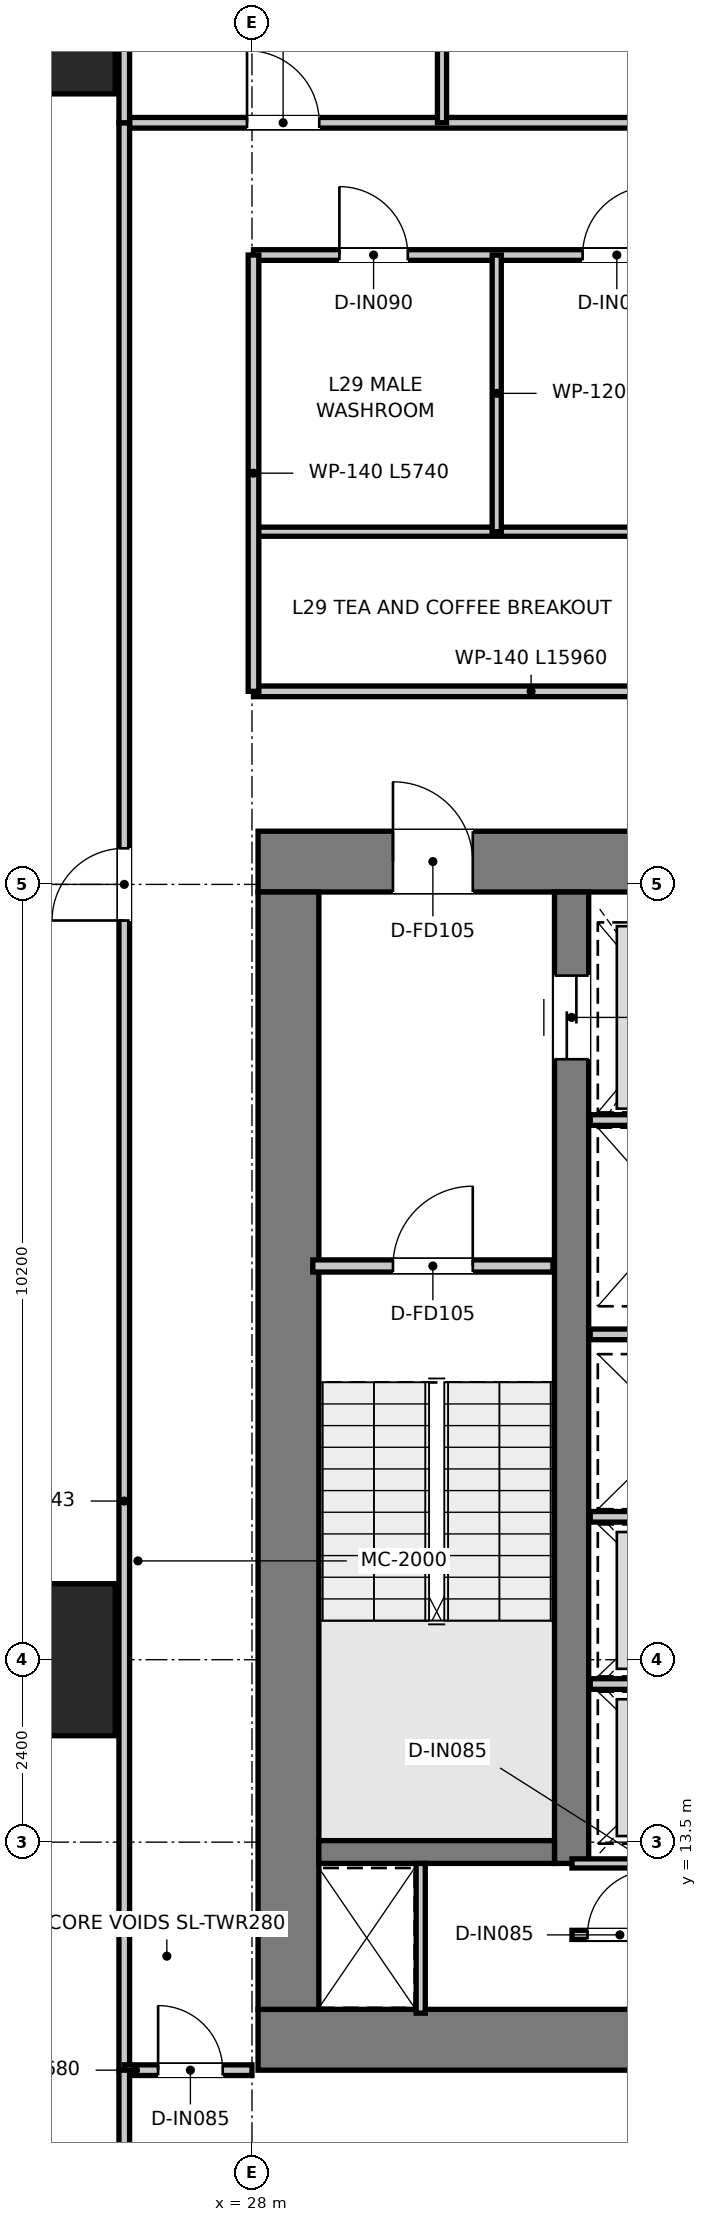
"""IFC4 building model, lengths in metres.
Left out: names, types, materials, properties, quantities, classifications, styles, units other than length and angle.
Written with IfcOpenShell. Run it as: python <this file> out.ifc"""

import sys

from ifc_helpers import new_model, si_unit, direction, frame, frame_2d, origin, origin_2d, place, context, subcontext, project, spatial, rectangle, extrude, source, transform, mapped, element, fill, save


model = new_model("IFC4")
c1 = context("Model", 3, precision=1e-05, world=origin(), true_north=direction((0.0, 1.0)))
c2 = subcontext(c1, "Body", "Model", "MODEL_VIEW")
j1 = project(units=[si_unit("LENGTHUNIT", "METRE"), si_unit("PLANEANGLEUNIT", "RADIAN")], contexts=[c1])
p1 = place(None, origin())
s1 = spatial("IfcSite", under=j1, at=p1, CompositionType="ELEMENT")
p2 = place(p1, origin())
s2 = spatial("IfcBuilding", under=s1, at=p2, CompositionType="ELEMENT")
p3 = place(p2, frame((0.0, 0.0, 121.65)))
s3 = spatial("IfcBuildingStorey", under=s2, at=p3, CompositionType="ELEMENT", Elevation=121.65)
p4 = place(p3, frame((28.08, 10.9, 0.0), z_axis=(0.0, 0.0, 1.0), x_axis=(1.0, 0.0, 0.0)))
e1 = element("IfcWall", 1, at=p4, inside=s3, PredefinedType="SHEAR", context=c2, shape_type="SweptSolid", body=[
    extrude(rectangle(XDim=15.84, YDim=0.8, at=frame_2d((7.92, 0.0))), origin(), (0.0, 0.0, 1.0), 3.95),
])
p5 = place(p3, frame((28.08, 26.4, 0.0), z_axis=(0.0, 0.0, 1.0), x_axis=(1.0, 0.0, 0.0)))
e2 = element("IfcWall", 2, at=p5, inside=s3, PredefinedType="SHEAR", context=c2, shape_type="SweptSolid", body=[
    extrude(rectangle(XDim=15.84, YDim=0.8, at=frame_2d((7.92, 0.0))), origin(), (0.0, 0.0, 1.0), 3.95),
])
p6 = place(p5, frame((7.22, 0.0, 0.0)))
e3 = element("IfcOpeningElement", 3, at=p6, cuts=e2, PredefinedType="OPENING", context=c2, shape_type="SweptSolid", body=[
    extrude(rectangle(XDim=1.4, YDim=2.2, at=frame_2d((0.7, 1.1))), frame((0.0, 0.41, 0.0), z_axis=(0.0, -1.0, 0.0), x_axis=(1.0, 0.0, 0.0)), (0.0, 0.0, 1.0), 0.82),
])
p7 = place(p5, frame((1.775, 0.0, 0.0)))
e4 = element("IfcOpeningElement", 4, at=p7, cuts=e2, PredefinedType="OPENING", context=c2, shape_type="SweptSolid", body=[
    extrude(rectangle(XDim=1.05, YDim=2.1, at=frame_2d((0.525, 1.05))), frame((0.0, 0.41, 0.0), z_axis=(0.0, -1.0, 0.0), x_axis=(1.0, 0.0, 0.0)), (0.0, 0.0, 1.0), 0.82),
])
p8 = place(p5, frame((13.015, 0.0, 0.0)))
e5 = element("IfcOpeningElement", 5, at=p8, cuts=e2, PredefinedType="OPENING", context=c2, shape_type="SweptSolid", body=[
    extrude(rectangle(XDim=1.05, YDim=2.1, at=frame_2d((0.525, 1.05))), frame((0.0, 0.41, 0.0), z_axis=(0.0, -1.0, 0.0), x_axis=(1.0, 0.0, 0.0)), (0.0, 0.0, 1.0), 0.82),
])
p9 = place(p3, frame((28.48, 11.3, 0.0), z_axis=(0.0, 0.0, 1.0), x_axis=(0.0, 1.0, 0.0)))
e6 = element("IfcWall", 6, at=p9, inside=s3, PredefinedType="SHEAR", context=c2, shape_type="SweptSolid", body=[
    extrude(rectangle(XDim=14.7, YDim=0.8, at=frame_2d((7.35, 0.0))), origin(), (0.0, 0.0, 1.0), 3.95),
])
p10 = place(p3, frame((32.205, 13.22, 0.0), z_axis=(0.0, 0.0, 1.0), x_axis=(0.0, 1.0, 0.0)))
e7 = element("IfcWall", 7, at=p10, inside=s3, PredefinedType="SHEAR", context=c2, shape_type="SweptSolid", body=[
    extrude(rectangle(XDim=12.78, YDim=0.45, at=frame_2d((6.39, 0.0))), origin(), (0.0, 0.0, 1.0), 3.95),
])
p11 = place(p10, frame((10.58, 0.0, 0.0)))
e8 = element("IfcOpeningElement", 8, at=p11, cuts=e7, PredefinedType="OPENING", context=c2, shape_type="SweptSolid", body=[
    extrude(rectangle(XDim=1.1, YDim=2.15, at=frame_2d((0.55, 1.075))), frame((0.0, 0.235, 0.0), z_axis=(0.0, -1.0, 0.0), x_axis=(1.0, 0.0, 0.0)), (0.0, 0.0, 1.0), 0.47),
])
p12 = place(p3, frame((28.88, 13.37, 0.0), z_axis=(0.0, 0.0, 1.0), x_axis=(1.0, 0.0, 0.0)))
e9 = element("IfcWall", 9, at=p12, inside=s3, PredefinedType="SHEAR", context=c2, shape_type="SweptSolid", body=[
    extrude(rectangle(XDim=3.1, YDim=0.3, at=frame_2d((1.55, 0.0))), origin(), (0.0, 0.0, 1.0), 3.95),
])
m1 = source(origin(), c2, "Body", "SweptSolid", [
    extrude(rectangle(XDim=2.0, YDim=2.0, at=origin_2d()), origin(), (0.0, 0.0, 1.0), 3.95),
])
for number, where, z_axis, x_axis in (
    (10, (25.2, 15.9, 0.0), (0.0, 0.0, 1.0), (1.0, 0.0, 0.0)),
    (11, (25.2, 37.5, 0.0), (0.0, 0.0, 1.0), (1.0, 0.0, 0.0)),
):
    element("IfcColumn", number, at=place(p3, frame(where, z_axis=z_axis, x_axis=x_axis)), inside=s3, PredefinedType="USERDEFINED", context=c2, shape_type="MappedRepresentation", body=[
        mapped(m1, transform((0.0, 0.0, 0.0), x_axis=(1.0, 0.0, 0.0), y_axis=(0.0, 1.0, 0.0), z_axis=(0.0, 0.0, 1.0), scale=1.0)),
    ])
p13 = place(p3, frame((28.8, 21.08, 0.0), z_axis=(0.0, 0.0, 1.0), x_axis=(1.0, 0.0, 0.0)))
e12 = element("IfcWall", 12, at=p13, inside=s3, PredefinedType="PARTITIONING", context=c2, shape_type="SweptSolid", body=[
    extrude(rectangle(XDim=3.16, YDim=0.16, at=frame_2d((1.58, 0.0))), origin(), (0.0, 0.0, 1.0), 3.67),
])
p14 = place(p13, frame((1.055, 0.0, 0.0)))
e13 = element("IfcOpeningElement", 13, at=p14, cuts=e12, PredefinedType="OPENING", context=c2, shape_type="SweptSolid", body=[
    extrude(rectangle(XDim=1.05, YDim=2.1, at=frame_2d((0.525, 1.05))), frame((0.0, 0.09, 0.0), z_axis=(0.0, -1.0, 0.0), x_axis=(1.0, 0.0, 0.0)), (0.0, 0.0, 1.0), 0.18),
])
p15 = place(p3, frame((32.45, 23.0, 0.0), z_axis=(0.0, 0.0, 1.0), x_axis=(1.0, 0.0, 0.0)))
e14 = element("IfcWall", 14, at=p15, inside=s3, PredefinedType="PARTITIONING", context=c2, shape_type="SweptSolid", body=[
    extrude(rectangle(XDim=2.27, YDim=0.14, at=frame_2d((1.135, 0.0))), origin(), (0.0, 0.0, 1.0), 2.67),
])
for number, where, z_axis, x_axis in (
    (15, (32.45, 17.78, 0.0), (0.0, 0.0, 1.0), (1.0, 0.0, 0.0)),
    (16, (32.45, 20.18, 0.0), (0.0, 0.0, 1.0), (1.0, 0.0, 0.0)),
    (17, (32.45, 15.58, 0.0), (0.0, 0.0, 1.0), (1.0, 0.0, 0.0)),
):
    element("IfcWall", number, at=place(p3, frame(where, z_axis=z_axis, x_axis=x_axis)), inside=s3, PredefinedType="PARTITIONING", context=c2, shape_type="SweptSolid", body=[
        extrude(rectangle(XDim=2.27, YDim=0.14, at=frame_2d((1.135, 0.0))), origin(), (0.0, 0.0, 1.0), 3.67),
    ])
p16 = place(p3, frame((30.22, 11.25, 0.0), z_axis=(0.0, 0.0, 1.0), x_axis=(0.0, 1.0, 0.0)))
e18 = element("IfcWall", 18, at=p16, inside=s3, PredefinedType="PARTITIONING", context=c2, shape_type="SweptSolid", body=[
    extrude(rectangle(XDim=1.97, YDim=0.12, at=frame_2d((0.985, 0.0))), origin(), (0.0, 0.0, 1.0), 3.67),
])
p17 = place(p3, frame((32.21, 13.22, 0.0), z_axis=(0.0, 0.0, 1.0), x_axis=(1.0, 0.0, 0.0)))
e19 = element("IfcWall", 19, at=p17, inside=s3, PredefinedType="PARTITIONING", context=c2, shape_type="SweptSolid", body=[
    extrude(rectangle(XDim=7.58, YDim=0.12, at=frame_2d((3.79, 0.0))), origin(), (0.0, 0.0, 1.0), 3.67),
])
p18 = place(p17, frame((3.365, 0.0, 0.0)))
e20 = element("IfcOpeningElement", 20, at=p18, cuts=e19, PredefinedType="OPENING", context=c2, shape_type="SweptSolid", body=[
    extrude(rectangle(XDim=0.85, YDim=2.1, at=frame_2d((0.425, 1.05))), frame((0.0, 0.07, 0.0), z_axis=(0.0, -1.0, 0.0), x_axis=(1.0, 0.0, 0.0)), (0.0, 0.0, 1.0), 0.14),
])
p19 = place(p3, frame((32.21, 12.28, 0.0), z_axis=(0.0, 0.0, 1.0), x_axis=(1.0, 0.0, 0.0)))
e21 = element("IfcWall", 21, at=p19, inside=s3, PredefinedType="PARTITIONING", context=c2, shape_type="SweptSolid", body=[
    extrude(rectangle(XDim=7.58, YDim=0.12, at=frame_2d((3.79, 0.0))), origin(), (0.0, 0.0, 1.0), 3.67),
])
p20 = place(p19, frame((0.205, 0.0, 0.0)))
e22 = element("IfcOpeningElement", 22, at=p20, cuts=e21, PredefinedType="OPENING", context=c2, shape_type="SweptSolid", body=[
    extrude(rectangle(XDim=0.85, YDim=2.1, at=frame_2d((0.425, 1.05))), frame((0.0, 0.07, 0.0), z_axis=(0.0, -1.0, 0.0), x_axis=(1.0, 0.0, 0.0)), (0.0, 0.0, 1.0), 0.14),
])
p21 = place(p19, frame((2.095, 0.0, 0.0)))
e23 = element("IfcOpeningElement", 23, at=p21, cuts=e21, PredefinedType="OPENING", context=c2, shape_type="SweptSolid", body=[
    extrude(rectangle(XDim=0.85, YDim=2.1, at=frame_2d((0.425, 1.05))), frame((0.0, 0.07, 0.0), z_axis=(0.0, -1.0, 0.0), x_axis=(1.0, 0.0, 0.0)), (0.0, 0.0, 1.0), 0.14),
])
p22 = place(p19, frame((4.635, 0.0, 0.0)))
e24 = element("IfcOpeningElement", 24, at=p22, cuts=e21, PredefinedType="OPENING", context=c2, shape_type="SweptSolid", body=[
    extrude(rectangle(XDim=0.85, YDim=2.1, at=frame_2d((0.425, 1.05))), frame((0.0, 0.07, 0.0), z_axis=(0.0, -1.0, 0.0), x_axis=(1.0, 0.0, 0.0)), (0.0, 0.0, 1.0), 0.14),
])
p23 = place(p19, frame((6.525, 0.0, 0.0)))
e25 = element("IfcOpeningElement", 25, at=p23, cuts=e21, PredefinedType="OPENING", context=c2, shape_type="SweptSolid", body=[
    extrude(rectangle(XDim=0.85, YDim=2.1, at=frame_2d((0.425, 1.05))), frame((0.0, 0.07, 0.0), z_axis=(0.0, -1.0, 0.0), x_axis=(1.0, 0.0, 0.0)), (0.0, 0.0, 1.0), 0.14),
])
p24 = place(p3, frame((28.02, 28.64, 0.0), z_axis=(0.0, 0.0, 1.0), x_axis=(1.0, 0.0, 0.0)))
e26 = element("IfcWall", 26, at=p24, inside=s3, PredefinedType="PARTITIONING", context=c2, shape_type="SweptSolid", body=[
    extrude(rectangle(XDim=15.96, YDim=0.14, at=frame_2d((7.98, 0.0))), origin(), (0.0, 0.0, 1.0), 3.08),
])
p25 = place(p24, frame((7.455, 0.0, 0.0)))
e27 = element("IfcOpeningElement", 27, at=p25, cuts=e26, PredefinedType="OPENING", context=c2, shape_type="SweptSolid", body=[
    extrude(rectangle(XDim=1.05, YDim=2.15, at=frame_2d((0.525, 1.075))), frame((0.0, 0.08, 0.0), z_axis=(0.0, -1.0, 0.0), x_axis=(1.0, 0.0, 0.0)), (0.0, 0.0, 1.0), 0.16),
])
p26 = place(p3, frame((28.02, 30.74, 0.0), z_axis=(0.0, 0.0, 1.0), x_axis=(1.0, 0.0, 0.0)))
e28 = element("IfcWall", 28, at=p26, inside=s3, PredefinedType="PARTITIONING", context=c2, shape_type="SweptSolid", body=[
    extrude(rectangle(XDim=15.96, YDim=0.12, at=frame_2d((7.98, 0.0))), origin(), (0.0, 0.0, 1.0), 3.08),
])
p27 = place(p3, frame((28.02, 34.38, 0.0), z_axis=(0.0, 0.0, 1.0), x_axis=(1.0, 0.0, 0.0)))
e29 = element("IfcWall", 29, at=p27, inside=s3, PredefinedType="PARTITIONING", context=c2, shape_type="SweptSolid", body=[
    extrude(rectangle(XDim=15.96, YDim=0.14, at=frame_2d((7.98, 0.0))), origin(), (0.0, 0.0, 1.0), 3.08),
])
p28 = place(p27, frame((1.13, 0.0, 0.0)))
e30 = element("IfcOpeningElement", 30, at=p28, cuts=e29, PredefinedType="OPENING", context=c2, shape_type="SweptSolid", body=[
    extrude(rectangle(XDim=0.9, YDim=2.1, at=frame_2d((0.45, 1.05))), frame((0.0, 0.08, 0.0), z_axis=(0.0, -1.0, 0.0), x_axis=(1.0, 0.0, 0.0)), (0.0, 0.0, 1.0), 0.16),
])
p29 = place(p27, frame((4.33, 0.0, 0.0)))
e31 = element("IfcOpeningElement", 31, at=p29, cuts=e29, PredefinedType="OPENING", context=c2, shape_type="SweptSolid", body=[
    extrude(rectangle(XDim=0.9, YDim=2.1, at=frame_2d((0.45, 1.05))), frame((0.0, 0.08, 0.0), z_axis=(0.0, -1.0, 0.0), x_axis=(1.0, 0.0, 0.0)), (0.0, 0.0, 1.0), 0.16),
])
p30 = place(p27, frame((7.355, 0.0, 0.0)))
e32 = element("IfcOpeningElement", 32, at=p30, cuts=e29, PredefinedType="OPENING", context=c2, shape_type="SweptSolid", body=[
    extrude(rectangle(XDim=0.95, YDim=2.1, at=frame_2d((0.475, 1.05))), frame((0.0, 0.08, 0.0), z_axis=(0.0, -1.0, 0.0), x_axis=(1.0, 0.0, 0.0)), (0.0, 0.0, 1.0), 0.16),
])
p31 = place(p27, frame((12.23, 0.0, 0.0)))
e33 = element("IfcOpeningElement", 33, at=p31, cuts=e29, PredefinedType="OPENING", context=c2, shape_type="SweptSolid", body=[
    extrude(rectangle(XDim=0.95, YDim=2.1, at=frame_2d((0.475, 1.05))), frame((0.0, 0.08, 0.0), z_axis=(0.0, -1.0, 0.0), x_axis=(1.0, 0.0, 0.0)), (0.0, 0.0, 1.0), 0.16),
])
p32 = place(p3, frame((28.02, 28.64, 0.0), z_axis=(0.0, 0.0, 1.0), x_axis=(0.0, 1.0, 0.0)))
e34 = element("IfcWall", 34, at=p32, inside=s3, PredefinedType="PARTITIONING", context=c2, shape_type="SweptSolid", body=[
    extrude(rectangle(XDim=5.74, YDim=0.14, at=frame_2d((2.87, 0.0))), origin(), (0.0, 0.0, 1.0), 3.27),
])
p33 = place(p3, frame((31.22, 30.74, 0.0), z_axis=(0.0, 0.0, 1.0), x_axis=(0.0, 1.0, 0.0)))
e35 = element("IfcWall", 35, at=p33, inside=s3, PredefinedType="PARTITIONING", context=c2, shape_type="SweptSolid", body=[
    extrude(rectangle(XDim=3.64, YDim=0.12, at=frame_2d((1.82, 0.0))), origin(), (0.0, 0.0, 1.0), 3.17),
])
p34 = place(p3, frame((26.32, 36.12, 0.0), z_axis=(0.0, 0.0, 1.0), x_axis=(1.0, 0.0, 0.0)))
e36 = element("IfcWall", 36, at=p34, inside=s3, PredefinedType="PARTITIONING", context=c2, shape_type="SweptSolid", body=[
    extrude(rectangle(XDim=19.36, YDim=0.14, at=frame_2d((9.68, 0.0))), origin(), (0.0, 0.0, 1.0), 3.08),
])
p35 = place(p34, frame((1.615, 0.0, 0.0)))
e37 = element("IfcOpeningElement", 37, at=p35, cuts=e36, PredefinedType="OPENING", context=c2, shape_type="SweptSolid", body=[
    extrude(rectangle(XDim=0.95, YDim=2.1, at=frame_2d((0.475, 1.05))), frame((0.0, 0.08, 0.0), z_axis=(0.0, -1.0, 0.0), x_axis=(1.0, 0.0, 0.0)), (0.0, 0.0, 1.0), 0.16),
])
p36 = place(p34, frame((6.705, 0.0, 0.0)))
e38 = element("IfcOpeningElement", 38, at=p36, cuts=e36, PredefinedType="OPENING", context=c2, shape_type="SweptSolid", body=[
    extrude(rectangle(XDim=0.95, YDim=2.1, at=frame_2d((0.475, 1.05))), frame((0.0, 0.08, 0.0), z_axis=(0.0, -1.0, 0.0), x_axis=(1.0, 0.0, 0.0)), (0.0, 0.0, 1.0), 0.16),
])
p37 = place(p34, frame((12.705, 0.0, 0.0)))
e39 = element("IfcOpeningElement", 39, at=p37, cuts=e36, PredefinedType="OPENING", context=c2, shape_type="SweptSolid", body=[
    extrude(rectangle(XDim=0.95, YDim=2.1, at=frame_2d((0.475, 1.05))), frame((0.0, 0.08, 0.0), z_axis=(0.0, -1.0, 0.0), x_axis=(1.0, 0.0, 0.0)), (0.0, 0.0, 1.0), 0.16),
])
p38 = place(p34, frame((17.295, 0.0, 0.0)))
e40 = element("IfcOpeningElement", 40, at=p38, cuts=e36, PredefinedType="OPENING", context=c2, shape_type="SweptSolid", body=[
    extrude(rectangle(XDim=0.95, YDim=2.1, at=frame_2d((0.475, 1.05))), frame((0.0, 0.08, 0.0), z_axis=(0.0, -1.0, 0.0), x_axis=(1.0, 0.0, 0.0)), (0.0, 0.0, 1.0), 0.16),
])
p39 = place(p3, frame((26.32, 10.5, 0.0), z_axis=(0.0, 0.0, 1.0), x_axis=(0.0, 1.0, 0.0)))
e41 = element("IfcWall", 41, at=p39, inside=s3, PredefinedType="PARTITIONING", context=c2, shape_type="SweptSolid", body=[
    extrude(rectangle(XDim=25.62, YDim=0.14, at=frame_2d((12.81, 0.0))), origin(), (0.0, 0.0, 1.0), 2.97),
])
p40 = place(p39, frame((15.125, 0.0, 0.0)))
e42 = element("IfcOpeningElement", 42, at=p40, cuts=e41, PredefinedType="OPENING", context=c2, shape_type="SweptSolid", body=[
    extrude(rectangle(XDim=0.95, YDim=2.1, at=frame_2d((0.475, 1.05))), frame((0.0, 0.08, 0.0), z_axis=(0.0, -1.0, 0.0), x_axis=(1.0, 0.0, 0.0)), (0.0, 0.0, 1.0), 0.16),
])
p41 = place(p3, frame((26.32, 10.5, 0.0), z_axis=(0.0, 0.0, 1.0), x_axis=(1.0, 0.0, 0.0)))
e43 = element("IfcWall", 43, at=p41, inside=s3, PredefinedType="PARTITIONING", context=c2, shape_type="SweptSolid", body=[
    extrude(rectangle(XDim=1.68, YDim=0.14, at=frame_2d((0.84, 0.0))), origin(), (0.0, 0.0, 1.0), 3.67),
])
p42 = place(p41, frame((0.445, 0.0, 0.0)))
e44 = element("IfcOpeningElement", 44, at=p42, cuts=e43, PredefinedType="OPENING", context=c2, shape_type="SweptSolid", body=[
    extrude(rectangle(XDim=0.85, YDim=2.1, at=frame_2d((0.425, 1.05))), frame((0.0, 0.08, 0.0), z_axis=(0.0, -1.0, 0.0), x_axis=(1.0, 0.0, 0.0)), (0.0, 0.0, 1.0), 0.16),
])
p43 = place(p3, frame((26.32, 36.12, 0.0), z_axis=(0.0, 0.0, 1.0), x_axis=(0.0, 1.0, 0.0)))
e45 = element("IfcWall", 45, at=p43, inside=s3, PredefinedType="PARTITIONING", context=c2, shape_type="SweptSolid", body=[
    extrude(rectangle(XDim=18.608, YDim=0.14, at=frame_2d((9.304, 0.0))), origin(), (0.0, 0.0, 1.0), 2.97),
])
p44 = place(p3, frame((26.32, 5.385, 0.0), z_axis=(0.0, 0.0, 1.0), x_axis=(0.0, 1.0, 0.0)))
e46 = element("IfcWall", 46, at=p44, inside=s3, PredefinedType="PARTITIONING", context=c2, shape_type="SweptSolid", body=[
    extrude(rectangle(XDim=5.115, YDim=0.14, at=frame_2d((2.558, 0.0))), origin(), (0.0, 0.0, 1.0), 3.67),
])
p45 = place(p3, frame((30.5, 36.12, 0.0), z_axis=(0.0, 0.0, 1.0), x_axis=(0.0, 1.0, 0.0)))
e47 = element("IfcWall", 47, at=p45, inside=s3, PredefinedType="PARTITIONING", context=c2, shape_type="SweptSolid", body=[
    extrude(rectangle(XDim=17.159, YDim=0.12, at=frame_2d((8.58, 0.0))), origin(), (0.0, 0.0, 1.0), 2.97),
])
p46 = place(p14, origin())
e48 = element("IfcDoor", 48, at=p46, inside=s3, OperationType="SINGLE_SWING_RIGHT", PredefinedType="DOOR", context=c2, shape_type="SweptSolid", body=[
    extrude(rectangle(XDim=1.05, YDim=2.1, at=frame_2d((0.525, 1.05))), frame((0.0, 0.025, 0.0), z_axis=(0.0, -1.0, 0.0), x_axis=(1.0, 0.0, 0.0)), (0.0, 0.0, 1.0), 0.05),
])
fill(e13, e48)
p47 = place(p7, origin())
e49 = element("IfcDoor", 49, at=p47, inside=s3, OperationType="SINGLE_SWING_LEFT", PredefinedType="DOOR", context=c2, shape_type="SweptSolid", body=[
    extrude(rectangle(XDim=1.05, YDim=2.1, at=frame_2d((0.525, 1.05))), frame((0.0, 0.025, 0.0), z_axis=(0.0, -1.0, 0.0), x_axis=(1.0, 0.0, 0.0)), (0.0, 0.0, 1.0), 0.05),
])
fill(e4, e49)
p48 = place(p11, origin())
e50 = element("IfcDoor", 50, at=p48, inside=s3, OperationType="DOUBLE_DOOR_SLIDING", PredefinedType="DOOR", context=c2, shape_type="SweptSolid", body=[
    extrude(rectangle(XDim=1.1, YDim=2.15, at=frame_2d((0.55, 1.075))), frame((0.0, 0.025, 0.0), z_axis=(0.0, -1.0, 0.0), x_axis=(1.0, 0.0, 0.0)), (0.0, 0.0, 1.0), 0.05),
])
fill(e8, e50)
p49 = place(p20, origin())
e51 = element("IfcDoor", 51, at=p49, inside=s3, OperationType="SINGLE_SWING_RIGHT", PredefinedType="DOOR", context=c2, shape_type="SweptSolid", body=[
    extrude(rectangle(XDim=0.85, YDim=2.1, at=frame_2d((0.425, 1.05))), frame((0.0, 0.025, 0.0), z_axis=(0.0, -1.0, 0.0), x_axis=(1.0, 0.0, 0.0)), (0.0, 0.0, 1.0), 0.05),
])
fill(e22, e51)
p50 = place(p28, origin())
e52 = element("IfcDoor", 52, at=p50, inside=s3, OperationType="SINGLE_SWING_LEFT", PredefinedType="DOOR", context=c2, shape_type="SweptSolid", body=[
    extrude(rectangle(XDim=0.9, YDim=2.1, at=frame_2d((0.45, 1.05))), frame((0.0, 0.025, 0.0), z_axis=(0.0, -1.0, 0.0), x_axis=(1.0, 0.0, 0.0)), (0.0, 0.0, 1.0), 0.05),
])
fill(e30, e52)
p51 = place(p29, origin())
e53 = element("IfcDoor", 53, at=p51, inside=s3, OperationType="SINGLE_SWING_RIGHT", PredefinedType="DOOR", context=c2, shape_type="SweptSolid", body=[
    extrude(rectangle(XDim=0.9, YDim=2.1, at=frame_2d((0.45, 1.05))), frame((0.0, 0.025, 0.0), z_axis=(0.0, -1.0, 0.0), x_axis=(1.0, 0.0, 0.0)), (0.0, 0.0, 1.0), 0.05),
])
fill(e31, e53)
p52 = place(p35, origin())
e54 = element("IfcDoor", 54, at=p52, inside=s3, OperationType="SINGLE_SWING_LEFT", PredefinedType="DOOR", context=c2, shape_type="SweptSolid", body=[
    extrude(rectangle(XDim=0.95, YDim=2.1, at=frame_2d((0.475, 1.05))), frame((0.0, 0.025, 0.0), z_axis=(0.0, -1.0, 0.0), x_axis=(1.0, 0.0, 0.0)), (0.0, 0.0, 1.0), 0.05),
])
fill(e37, e54)
p53 = place(p40, origin())
e55 = element("IfcDoor", 55, at=p53, inside=s3, OperationType="SINGLE_SWING_LEFT", PredefinedType="DOOR", context=c2, shape_type="SweptSolid", body=[
    extrude(rectangle(XDim=0.95, YDim=2.1, at=frame_2d((0.475, 1.05))), frame((0.0, 0.025, 0.0), z_axis=(0.0, -1.0, 0.0), x_axis=(1.0, 0.0, 0.0)), (0.0, 0.0, 1.0), 0.05),
])
fill(e42, e55)
p54 = place(p42, origin())
e56 = element("IfcDoor", 56, at=p54, inside=s3, OperationType="SINGLE_SWING_LEFT", PredefinedType="DOOR", context=c2, shape_type="SweptSolid", body=[
    extrude(rectangle(XDim=0.85, YDim=2.1, at=frame_2d((0.425, 1.05))), frame((0.0, 0.025, 0.0), z_axis=(0.0, -1.0, 0.0), x_axis=(1.0, 0.0, 0.0)), (0.0, 0.0, 1.0), 0.05),
])
fill(e44, e56)
save(model, sys.argv[1])
